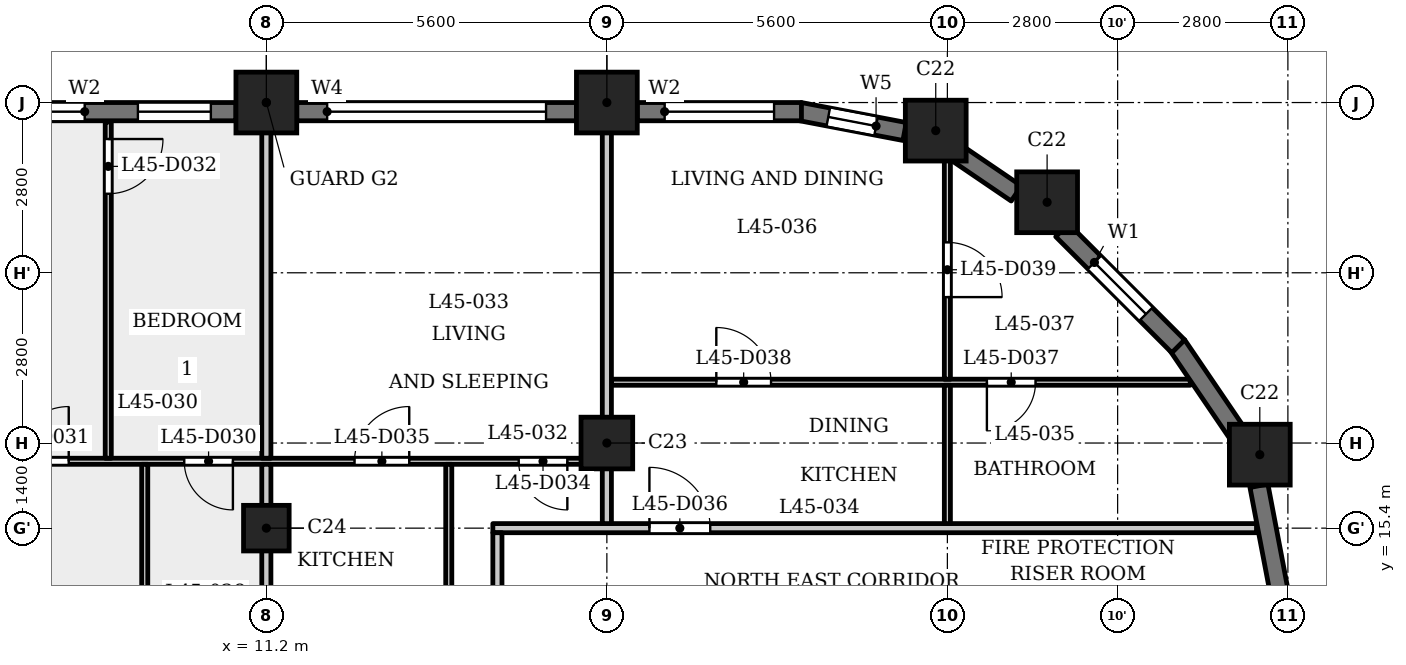
"""IFC4 building model, lengths in metres.
Left out: names, types, materials, properties, quantities, classifications, styles, units other than length and angle.
Written with IfcOpenShell. Run it as: python <this file> out.ifc"""

import sys

from ifc_helpers import new_model, si_unit, direction, frame, frame_2d, origin, origin_2d, place, context, subcontext, project, spatial, rectangle, extrude, element, fill, save


model = new_model("IFC4")
c1 = context("Model", 3, precision=1e-05, world=origin(), true_north=direction((0.0, 1.0)))
c2 = subcontext(c1, "Body", "Model", "MODEL_VIEW")
j1 = project(units=[si_unit("LENGTHUNIT", "METRE"), si_unit("PLANEANGLEUNIT", "RADIAN")], contexts=[c1])
p1 = place(None, origin())
s1 = spatial("IfcSite", under=j1, at=p1, CompositionType="ELEMENT")
p2 = place(p1, origin())
s2 = spatial("IfcBuilding", under=s1, at=p2, CompositionType="ELEMENT")
p3 = place(p2, frame((0.0, 0.0, 174.6)))
s3 = spatial("IfcBuildingStorey", under=s2, at=p3, CompositionType="ELEMENT", Elevation=174.6)
for number, where, z_axis, x_axis in (
    (1, (27.538, 16.609, 0.0), (0.0, 0.0, 1.0), (1.0, 0.0, 0.0)),
    (2, (24.04, 20.76, 0.0), (0.0, 0.0, 1.0), (1.0, 0.0, 0.0)),
    (3, (22.209, 21.938, 0.0), (0.0, 0.0, 1.0), (1.0, 0.0, 0.0)),
    (4, (16.8, 22.4, 0.0), (0.0, 0.0, 1.0), (1.0, 0.0, 0.0)),
    (5, (11.2, 22.4, 0.0), (0.0, 0.0, 1.0), (1.0, 0.0, 0.0)),
):
    element("IfcColumn", number, at=place(p3, frame(where, z_axis=z_axis, x_axis=x_axis)), inside=s3, PredefinedType="COLUMN", context=c2, shape_type="SweptSolid", body=[
        extrude(rectangle(XDim=1.0, YDim=1.0, at=origin_2d()), origin(), (0.0, 0.0, 1.0), 3.5),
    ])
p4 = place(p3, frame((16.8, 16.8, 0.0), z_axis=(0.0, 0.0, 1.0), x_axis=(1.0, 0.0, 0.0)))
e6 = element("IfcColumn", 6, at=p4, inside=s3, PredefinedType="COLUMN", context=c2, shape_type="SweptSolid", body=[
    extrude(rectangle(XDim=0.85, YDim=0.85, at=origin_2d()), origin(), (0.0, 0.0, 1.0), 3.5),
])
p5 = place(p3, frame((11.2, 15.4, 0.0), z_axis=(0.0, 0.0, 1.0), x_axis=(1.0, 0.0, 0.0)))
e7 = element("IfcColumn", 7, at=p5, inside=s3, PredefinedType="COLUMN", context=c2, shape_type="SweptSolid", body=[
    extrude(rectangle(XDim=0.75, YDim=0.75, at=origin_2d()), origin(), (0.0, 0.0, 1.0), 3.5),
])
for number, where, z_axis, x_axis in (
    (8, (27.853, 14.372, 0.0), (0.0, 0.0, 1.0), (-0.187, 0.982, 0.0)),
    (9, (27.166, 16.96, 0.0), (0.0, 0.0, 1.0), (-0.562, 0.827, 0.0)),
):
    element("IfcWall", number, at=place(p3, frame(where, z_axis=z_axis, x_axis=x_axis)), inside=s3, PredefinedType="SOLIDWALL", context=c2, shape_type="SweptSolid", body=[
        extrude(rectangle(XDim=1.756, YDim=0.3, at=frame_2d((0.878, 0.0))), origin(), (0.0, 0.0, 1.0), 2.4),
    ])
p6 = place(p3, frame((26.197, 18.391, 0.0), z_axis=(0.0, 0.0, 1.0), x_axis=(-0.707061571201, 0.707151988282, 0.0)))
e10 = element("IfcWall", 10, at=p6, inside=s3, PredefinedType="SOLIDWALL", context=c2, shape_type="SweptSolid", body=[
    extrude(rectangle(XDim=2.7, YDim=0.3, at=frame_2d((1.35, 0.0))), origin(), (0.0, 0.0, 1.0), 2.4),
])
p7 = place(p6, frame((0.75, 0.0, 0.6)))
e11 = element("IfcOpeningElement", 11, at=p7, cuts=e10, PredefinedType="OPENING", context=c2, shape_type="SweptSolid", body=[
    extrude(rectangle(XDim=1.2, YDim=1.55, at=frame_2d((0.6, 0.775))), frame((0.0, 0.16, 0.0), z_axis=(0.0, -1.0, 0.0), x_axis=(1.0, 0.0, 0.0)), (0.0, 0.0, 1.0), 0.32),
])
p8 = place(p3, frame((23.534, 20.904, 0.0), z_axis=(0.0, 0.0, 1.0), x_axis=(-0.827103906596, 0.56204904385, 0.0)))
e12 = element("IfcWall", 12, at=p8, inside=s3, PredefinedType="SOLIDWALL", context=c2, shape_type="SweptSolid", body=[
    extrude(rectangle(XDim=1.177, YDim=0.3, at=frame_2d((0.589, 0.0))), origin(), (0.0, 0.0, 1.0), 3.15),
])
p9 = place(p3, frame((21.697, 21.924, 0.0), z_axis=(0.0, 0.0, 1.0), x_axis=(-0.982284988433, 0.187393173565, 0.0)))
e13 = element("IfcWall", 13, at=p9, inside=s3, PredefinedType="SOLIDWALL", context=c2, shape_type="SweptSolid", body=[
    extrude(rectangle(XDim=1.756, YDim=0.3, at=frame_2d((0.878, 0.0))), origin(), (0.0, 0.0, 1.0), 2.4),
])
p10 = place(p9, frame((0.478, 0.0, 0.6)))
e14 = element("IfcOpeningElement", 14, at=p10, cuts=e13, PredefinedType="OPENING", context=c2, shape_type="SweptSolid", body=[
    extrude(rectangle(XDim=0.8, YDim=1.55, at=frame_2d((0.4, 0.775))), frame((0.0, 0.16, 0.0), z_axis=(0.0, -1.0, 0.0), x_axis=(1.0, 0.0, 0.0)), (0.0, 0.0, 1.0), 0.32),
])
p11 = place(p3, frame((20.0, 22.25, 0.0), z_axis=(0.0, 0.0, 1.0), x_axis=(-1.0, 0.0, 0.0)))
e15 = element("IfcWall", 15, at=p11, inside=s3, PredefinedType="SOLIDWALL", context=c2, shape_type="SweptSolid", body=[
    extrude(rectangle(XDim=2.7, YDim=0.3, at=frame_2d((1.35, 0.0))), origin(), (0.0, 0.0, 1.0), 2.4),
])
p12 = place(p11, frame((0.45, 0.0, 0.9)))
e16 = element("IfcOpeningElement", 16, at=p12, cuts=e15, PredefinedType="OPENING", context=c2, shape_type="SweptSolid", body=[
    extrude(rectangle(XDim=1.8, YDim=1.25, at=frame_2d((0.9, 0.625))), frame((0.0, 0.16, 0.0), z_axis=(0.0, -1.0, 0.0), x_axis=(1.0, 0.0, 0.0)), (0.0, 0.0, 1.0), 0.32),
])
p13 = place(p3, frame((16.3, 22.25, 0.0), z_axis=(0.0, 0.0, 1.0), x_axis=(-1.0, 0.0, 0.0)))
e17 = element("IfcWall", 17, at=p13, inside=s3, PredefinedType="SOLIDWALL", context=c2, shape_type="SweptSolid", body=[
    extrude(rectangle(XDim=4.6, YDim=0.3, at=frame_2d((2.3, 0.0))), origin(), (0.0, 0.0, 1.0), 2.4),
])
p14 = place(p13, frame((0.5, 0.0, 1.2)))
e18 = element("IfcOpeningElement", 18, at=p14, cuts=e17, PredefinedType="OPENING", context=c2, shape_type="SweptSolid", body=[
    extrude(rectangle(XDim=3.6, YDim=0.95, at=frame_2d((1.8, 0.475))), frame((0.0, 0.16, 0.0), z_axis=(0.0, -1.0, 0.0), x_axis=(1.0, 0.0, 0.0)), (0.0, 0.0, 1.0), 0.32),
])
p15 = place(p3, frame((10.7, 22.25, 0.0), z_axis=(0.0, 0.0, 1.0), x_axis=(-1.0, 0.0, 0.0)))
e19 = element("IfcWall", 19, at=p15, inside=s3, PredefinedType="SOLIDWALL", context=c2, shape_type="SweptSolid", body=[
    extrude(rectangle(XDim=4.6, YDim=0.3, at=frame_2d((2.3, 0.0))), origin(), (0.0, 0.0, 1.0), 2.4),
])
p16 = place(p15, frame((0.413, 0.0, 0.6)))
e20 = element("IfcOpeningElement", 20, at=p16, cuts=e19, PredefinedType="OPENING", context=c2, shape_type="SweptSolid", body=[
    extrude(rectangle(XDim=1.2, YDim=1.55, at=frame_2d((0.6, 0.775))), frame((0.0, 0.16, 0.0), z_axis=(0.0, -1.0, 0.0), x_axis=(1.0, 0.0, 0.0)), (0.0, 0.0, 1.0), 0.32),
])
p17 = place(p15, frame((2.488, 0.0, 0.9)))
e21 = element("IfcOpeningElement", 21, at=p17, cuts=e19, PredefinedType="OPENING", context=c2, shape_type="SweptSolid", body=[
    extrude(rectangle(XDim=1.8, YDim=1.25, at=frame_2d((0.9, 0.625))), frame((0.0, 0.16, 0.0), z_axis=(0.0, -1.0, 0.0), x_axis=(1.0, 0.0, 0.0)), (0.0, 0.0, 1.0), 0.32),
])
p18 = place(p3, frame((14.925, 15.4, 0.0), z_axis=(0.0, 0.0, 1.0), x_axis=(1.0, 0.0, 0.0)))
e22 = element("IfcWall", 22, at=p18, inside=s3, PredefinedType="PARTITIONING", context=c2, shape_type="SweptSolid", body=[
    extrude(rectangle(XDim=12.559, YDim=0.15, at=frame_2d((6.279, 0.0))), origin(), (0.0, 0.0, 1.0), 3.15),
])
p19 = place(p18, frame((2.575, 0.0, 0.0)))
e23 = element("IfcOpeningElement", 23, at=p19, cuts=e22, PredefinedType="OPENING", context=c2, shape_type="SweptSolid", body=[
    extrude(rectangle(XDim=1.0, YDim=2.1, at=frame_2d((0.5, 1.05))), frame((0.0, 0.085, 0.0), z_axis=(0.0, -1.0, 0.0), x_axis=(1.0, 0.0, 0.0)), (0.0, 0.0, 1.0), 0.17),
])
p20 = place(p3, frame((-16.725, 16.5, 0.0), z_axis=(0.0, 0.0, 1.0), x_axis=(1.0, 0.0, 0.0)))
e24 = element("IfcWall", 24, at=p20, inside=s3, PredefinedType="PARTITIONING", context=c2, shape_type="SweptSolid", body=[
    extrude(rectangle(XDim=33.45, YDim=0.1, at=frame_2d((16.725, 0.0))), origin(), (0.0, 0.0, 1.0), 3.15),
])
p21 = place(p20, frame((0.575, 0.0, 0.0)))
e25 = element("IfcOpeningElement", 25, at=p21, cuts=e24, PredefinedType="OPENING", context=c2, shape_type="SweptSolid", body=[
    extrude(rectangle(XDim=0.8, YDim=2.1, at=frame_2d((0.4, 1.05))), frame((0.0, 0.06, 0.0), z_axis=(0.0, -1.0, 0.0), x_axis=(1.0, 0.0, 0.0)), (0.0, 0.0, 1.0), 0.12),
])
p22 = place(p20, frame((3.225, 0.0, 0.0)))
e26 = element("IfcOpeningElement", 26, at=p22, cuts=e24, PredefinedType="OPENING", context=c2, shape_type="SweptSolid", body=[
    extrude(rectangle(XDim=0.9, YDim=2.1, at=frame_2d((0.45, 1.05))), frame((0.0, 0.06, 0.0), z_axis=(0.0, -1.0, 0.0), x_axis=(1.0, 0.0, 0.0)), (0.0, 0.0, 1.0), 0.12),
])
p23 = place(p20, frame((6.775, 0.0, 0.0)))
e27 = element("IfcOpeningElement", 27, at=p23, cuts=e24, PredefinedType="OPENING", context=c2, shape_type="SweptSolid", body=[
    extrude(rectangle(XDim=0.9, YDim=2.1, at=frame_2d((0.45, 1.05))), frame((0.0, 0.06, 0.0), z_axis=(0.0, -1.0, 0.0), x_axis=(1.0, 0.0, 0.0)), (0.0, 0.0, 1.0), 0.12),
])
p24 = place(p20, frame((8.825, 0.0, 0.0)))
e28 = element("IfcOpeningElement", 28, at=p24, cuts=e24, PredefinedType="OPENING", context=c2, shape_type="SweptSolid", body=[
    extrude(rectangle(XDim=0.9, YDim=2.1, at=frame_2d((0.45, 1.05))), frame((0.0, 0.06, 0.0), z_axis=(0.0, -1.0, 0.0), x_axis=(1.0, 0.0, 0.0)), (0.0, 0.0, 1.0), 0.12),
])
p25 = place(p20, frame((20.775, 0.0, 0.0)))
e29 = element("IfcOpeningElement", 29, at=p25, cuts=e24, PredefinedType="OPENING", context=c2, shape_type="SweptSolid", body=[
    extrude(rectangle(XDim=0.8, YDim=2.1, at=frame_2d((0.4, 1.05))), frame((0.0, 0.06, 0.0), z_axis=(0.0, -1.0, 0.0), x_axis=(1.0, 0.0, 0.0)), (0.0, 0.0, 1.0), 0.12),
])
p26 = place(p20, frame((17.325, 0.0, 0.0)))
e30 = element("IfcOpeningElement", 30, at=p26, cuts=e24, PredefinedType="OPENING", context=c2, shape_type="SweptSolid", body=[
    extrude(rectangle(XDim=0.9, YDim=2.1, at=frame_2d((0.45, 1.05))), frame((0.0, 0.06, 0.0), z_axis=(0.0, -1.0, 0.0), x_axis=(1.0, 0.0, 0.0)), (0.0, 0.0, 1.0), 0.12),
])
p27 = place(p20, frame((12.375, 0.0, 0.0)))
e31 = element("IfcOpeningElement", 31, at=p27, cuts=e24, PredefinedType="OPENING", context=c2, shape_type="SweptSolid", body=[
    extrude(rectangle(XDim=0.9, YDim=2.1, at=frame_2d((0.45, 1.05))), frame((0.0, 0.06, 0.0), z_axis=(0.0, -1.0, 0.0), x_axis=(1.0, 0.0, 0.0)), (0.0, 0.0, 1.0), 0.12),
])
p28 = place(p20, frame((14.425, 0.0, 0.0)))
e32 = element("IfcOpeningElement", 32, at=p28, cuts=e24, PredefinedType="OPENING", context=c2, shape_type="SweptSolid", body=[
    extrude(rectangle(XDim=0.9, YDim=2.1, at=frame_2d((0.45, 1.05))), frame((0.0, 0.06, 0.0), z_axis=(0.0, -1.0, 0.0), x_axis=(1.0, 0.0, 0.0)), (0.0, 0.0, 1.0), 0.12),
])
p29 = place(p20, frame((26.575, 0.0, 0.0)))
e33 = element("IfcOpeningElement", 33, at=p29, cuts=e24, PredefinedType="OPENING", context=c2, shape_type="SweptSolid", body=[
    extrude(rectangle(XDim=0.8, YDim=2.1, at=frame_2d((0.4, 1.05))), frame((0.0, 0.06, 0.0), z_axis=(0.0, -1.0, 0.0), x_axis=(1.0, 0.0, 0.0)), (0.0, 0.0, 1.0), 0.12),
])
p30 = place(p20, frame((23.775, 0.0, 0.0)))
e34 = element("IfcOpeningElement", 34, at=p30, cuts=e24, PredefinedType="OPENING", context=c2, shape_type="SweptSolid", body=[
    extrude(rectangle(XDim=0.9, YDim=2.1, at=frame_2d((0.45, 1.05))), frame((0.0, 0.06, 0.0), z_axis=(0.0, -1.0, 0.0), x_axis=(1.0, 0.0, 0.0)), (0.0, 0.0, 1.0), 0.12),
])
p31 = place(p20, frame((32.075, 0.0, 0.0)))
e35 = element("IfcOpeningElement", 35, at=p31, cuts=e24, PredefinedType="OPENING", context=c2, shape_type="SweptSolid", body=[
    extrude(rectangle(XDim=0.8, YDim=2.1, at=frame_2d((0.4, 1.05))), frame((0.0, 0.06, 0.0), z_axis=(0.0, -1.0, 0.0), x_axis=(1.0, 0.0, 0.0)), (0.0, 0.0, 1.0), 0.12),
])
p32 = place(p20, frame((29.375, 0.0, 0.0)))
e36 = element("IfcOpeningElement", 36, at=p32, cuts=e24, PredefinedType="OPENING", context=c2, shape_type="SweptSolid", body=[
    extrude(rectangle(XDim=0.9, YDim=2.1, at=frame_2d((0.45, 1.05))), frame((0.0, 0.06, 0.0), z_axis=(0.0, -1.0, 0.0), x_axis=(1.0, 0.0, 0.0)), (0.0, 0.0, 1.0), 0.12),
])
p33 = place(p3, frame((16.875, 17.8, 0.0), z_axis=(0.0, 0.0, 1.0), x_axis=(1.0, 0.0, 0.0)))
e37 = element("IfcWall", 37, at=p33, inside=s3, PredefinedType="PARTITIONING", context=c2, shape_type="SweptSolid", body=[
    extrude(rectangle(XDim=9.519, YDim=0.1, at=frame_2d((4.76, 0.0))), origin(), (0.0, 0.0, 1.0), 3.15),
])
p34 = place(p33, frame((6.175, 0.0, 0.0)))
e38 = element("IfcOpeningElement", 38, at=p34, cuts=e37, PredefinedType="OPENING", context=c2, shape_type="SweptSolid", body=[
    extrude(rectangle(XDim=0.8, YDim=2.1, at=frame_2d((0.4, 1.05))), frame((0.0, 0.06, 0.0), z_axis=(0.0, -1.0, 0.0), x_axis=(1.0, 0.0, 0.0)), (0.0, 0.0, 1.0), 0.12),
])
p35 = place(p33, frame((1.725, 0.0, 0.0)))
e39 = element("IfcOpeningElement", 39, at=p35, cuts=e37, PredefinedType="OPENING", context=c2, shape_type="SweptSolid", body=[
    extrude(rectangle(XDim=0.9, YDim=2.1, at=frame_2d((0.45, 1.05))), frame((0.0, 0.06, 0.0), z_axis=(0.0, -1.0, 0.0), x_axis=(1.0, 0.0, 0.0)), (0.0, 0.0, 1.0), 0.12),
])
p36 = place(p3, frame((8.6, 16.55, 0.0), z_axis=(0.0, 0.0, 1.0), x_axis=(0.0, 1.0, 0.0)))
e40 = element("IfcWall", 40, at=p36, inside=s3, PredefinedType="PARTITIONING", context=c2, shape_type="SweptSolid", body=[
    extrude(rectangle(XDim=5.53, YDim=0.1, at=frame_2d((2.765, 0.0))), origin(), (0.0, 0.0, 1.0), 3.15),
])
p37 = place(p36, frame((4.35, 0.0, 0.0)))
e41 = element("IfcOpeningElement", 41, at=p37, cuts=e40, PredefinedType="OPENING", context=c2, shape_type="SweptSolid", body=[
    extrude(rectangle(XDim=0.9, YDim=2.1, at=frame_2d((0.45, 1.05))), frame((0.0, 0.06, 0.0), z_axis=(0.0, -1.0, 0.0), x_axis=(1.0, 0.0, 0.0)), (0.0, 0.0, 1.0), 0.12),
])
p38 = place(p3, frame((9.2, 13.275, 0.0), z_axis=(0.0, 0.0, 1.0), x_axis=(0.0, 1.0, 0.0)))
e42 = element("IfcWall", 42, at=p38, inside=s3, PredefinedType="PARTITIONING", context=c2, shape_type="SweptSolid", body=[
    extrude(rectangle(XDim=3.175, YDim=0.1, at=frame_2d((1.587, 0.0))), origin(), (0.0, 0.0, 1.0), 3.15),
])
p39 = place(p3, frame((11.2, 13.275, 0.0), z_axis=(0.0, 0.0, 1.0), x_axis=(0.0, 1.0, 0.0)))
e43 = element("IfcWall", 43, at=p39, inside=s3, PredefinedType="PARTITIONING", context=c2, shape_type="SweptSolid", body=[
    extrude(rectangle(XDim=3.175, YDim=0.15, at=frame_2d((1.587, 0.0))), origin(), (0.0, 0.0, 1.0), 3.15),
])
p40 = place(p3, frame((11.2, 16.55, 0.0), z_axis=(0.0, 0.0, 1.0), x_axis=(0.0, 1.0, 0.0)))
e44 = element("IfcWall", 44, at=p40, inside=s3, PredefinedType="PARTITIONING", context=c2, shape_type="SweptSolid", body=[
    extrude(rectangle(XDim=6.33, YDim=0.15, at=frame_2d((3.165, 0.0))), origin(), (0.0, 0.0, 1.0), 3.15),
])
p41 = place(p3, frame((14.2, 13.275, 0.0), z_axis=(0.0, 0.0, 1.0), x_axis=(0.0, 1.0, 0.0)))
e45 = element("IfcWall", 45, at=p41, inside=s3, PredefinedType="PARTITIONING", context=c2, shape_type="SweptSolid", body=[
    extrude(rectangle(XDim=3.175, YDim=0.1, at=frame_2d((1.587, 0.0))), origin(), (0.0, 0.0, 1.0), 3.15),
])
p42 = place(p3, frame((15.0, 13.275, 0.0), z_axis=(0.0, 0.0, 1.0), x_axis=(0.0, 1.0, 0.0)))
e46 = element("IfcWall", 46, at=p42, inside=s3, PredefinedType="PARTITIONING", context=c2, shape_type="SweptSolid", body=[
    extrude(rectangle(XDim=2.05, YDim=0.15, at=frame_2d((1.025, 0.0))), origin(), (0.0, 0.0, 1.0), 3.15),
])
p43 = place(p3, frame((16.8, 15.475, 0.0), z_axis=(0.0, 0.0, 1.0), x_axis=(0.0, 1.0, 0.0)))
e47 = element("IfcWall", 47, at=p43, inside=s3, PredefinedType="PARTITIONING", context=c2, shape_type="SweptSolid", body=[
    extrude(rectangle(XDim=7.405, YDim=0.15, at=frame_2d((3.702, 0.0))), origin(), (0.0, 0.0, 1.0), 3.15),
])
p44 = place(p3, frame((22.4, 15.475, 0.0), z_axis=(0.0, 0.0, 1.0), x_axis=(0.0, 1.0, 0.0)))
e48 = element("IfcWall", 48, at=p44, inside=s3, PredefinedType="PARTITIONING", context=c2, shape_type="SweptSolid", body=[
    extrude(rectangle(XDim=2.275, YDim=0.1, at=frame_2d((1.137, 0.0))), origin(), (0.0, 0.0, 1.0), 3.15),
])
p45 = place(p3, frame((22.4, 17.85, 0.0), z_axis=(0.0, 0.0, 1.0), x_axis=(0.0, 1.0, 0.0)))
e49 = element("IfcWall", 49, at=p45, inside=s3, PredefinedType="PARTITIONING", context=c2, shape_type="SweptSolid", body=[
    extrude(rectangle(XDim=3.87, YDim=0.1, at=frame_2d((1.935, 0.0))), origin(), (0.0, 0.0, 1.0), 3.15),
])
p46 = place(p45, frame((1.35, 0.0, 0.0)))
e50 = element("IfcOpeningElement", 50, at=p46, cuts=e49, PredefinedType="OPENING", context=c2, shape_type="SweptSolid", body=[
    extrude(rectangle(XDim=0.9, YDim=2.1, at=frame_2d((0.45, 1.05))), frame((0.0, 0.06, 0.0), z_axis=(0.0, -1.0, 0.0), x_axis=(1.0, 0.0, 0.0)), (0.0, 0.0, 1.0), 0.12),
])
p47 = place(p29, origin())
e51 = element("IfcDoor", 51, at=p47, inside=s3, OperationType="SINGLE_SWING_RIGHT", PredefinedType="DOOR", context=c2, shape_type="SweptSolid", body=[
    extrude(rectangle(XDim=0.8, YDim=2.1, at=frame_2d((0.4, 1.05))), frame((0.0, 0.025, 0.0), z_axis=(0.0, -1.0, 0.0), x_axis=(1.0, 0.0, 0.0)), (0.0, 0.0, 1.0), 0.05),
])
fill(e33, e51)
p48 = place(p30, origin())
e52 = element("IfcDoor", 52, at=p48, inside=s3, OperationType="SINGLE_SWING_LEFT", PredefinedType="DOOR", context=c2, shape_type="SweptSolid", body=[
    extrude(rectangle(XDim=0.9, YDim=2.1, at=frame_2d((0.45, 1.05))), frame((0.0, 0.025, 0.0), z_axis=(0.0, -1.0, 0.0), x_axis=(1.0, 0.0, 0.0)), (0.0, 0.0, 1.0), 0.05),
])
fill(e34, e52)
p49 = place(p37, origin())
e53 = element("IfcDoor", 53, at=p49, inside=s3, OperationType="SINGLE_SWING_RIGHT", PredefinedType="DOOR", context=c2, shape_type="SweptSolid", body=[
    extrude(rectangle(XDim=0.9, YDim=2.1, at=frame_2d((0.45, 1.05))), frame((0.0, 0.025, 0.0), z_axis=(0.0, -1.0, 0.0), x_axis=(1.0, 0.0, 0.0)), (0.0, 0.0, 1.0), 0.05),
])
fill(e41, e53)
p50 = place(p31, origin())
e54 = element("IfcDoor", 54, at=p50, inside=s3, OperationType="SINGLE_SWING_RIGHT", PredefinedType="DOOR", context=c2, shape_type="SweptSolid", body=[
    extrude(rectangle(XDim=0.8, YDim=2.1, at=frame_2d((0.4, 1.05))), frame((0.0, 0.025, 0.0), z_axis=(0.0, -1.0, 0.0), x_axis=(1.0, 0.0, 0.0)), (0.0, 0.0, 1.0), 0.05),
])
fill(e35, e54)
p51 = place(p32, origin())
e55 = element("IfcDoor", 55, at=p51, inside=s3, OperationType="SINGLE_SWING_LEFT", PredefinedType="DOOR", context=c2, shape_type="SweptSolid", body=[
    extrude(rectangle(XDim=0.9, YDim=2.1, at=frame_2d((0.45, 1.05))), frame((0.0, 0.025, 0.0), z_axis=(0.0, -1.0, 0.0), x_axis=(1.0, 0.0, 0.0)), (0.0, 0.0, 1.0), 0.05),
])
fill(e36, e55)
p52 = place(p19, origin())
e56 = element("IfcDoor", 56, at=p52, inside=s3, OperationType="SINGLE_SWING_RIGHT", PredefinedType="DOOR", context=c2, shape_type="SweptSolid", body=[
    extrude(rectangle(XDim=1.0, YDim=2.1, at=frame_2d((0.5, 1.05))), frame((0.0, 0.025, 0.0), z_axis=(0.0, -1.0, 0.0), x_axis=(1.0, 0.0, 0.0)), (0.0, 0.0, 1.0), 0.05),
])
fill(e23, e56)
p53 = place(p34, origin())
e57 = element("IfcDoor", 57, at=p53, inside=s3, OperationType="SINGLE_SWING_LEFT", PredefinedType="DOOR", context=c2, shape_type="SweptSolid", body=[
    extrude(rectangle(XDim=0.8, YDim=2.1, at=frame_2d((0.4, 1.05))), frame((0.0, 0.025, 0.0), z_axis=(0.0, -1.0, 0.0), x_axis=(1.0, 0.0, 0.0)), (0.0, 0.0, 1.0), 0.05),
])
fill(e38, e57)
p54 = place(p35, origin())
e58 = element("IfcDoor", 58, at=p54, inside=s3, OperationType="SINGLE_SWING_RIGHT", PredefinedType="DOOR", context=c2, shape_type="SweptSolid", body=[
    extrude(rectangle(XDim=0.9, YDim=2.1, at=frame_2d((0.45, 1.05))), frame((0.0, 0.025, 0.0), z_axis=(0.0, -1.0, 0.0), x_axis=(1.0, 0.0, 0.0)), (0.0, 0.0, 1.0), 0.05),
])
fill(e39, e58)
p55 = place(p46, origin())
e59 = element("IfcDoor", 59, at=p55, inside=s3, OperationType="SINGLE_SWING_LEFT", PredefinedType="DOOR", context=c2, shape_type="SweptSolid", body=[
    extrude(rectangle(XDim=0.9, YDim=2.1, at=frame_2d((0.45, 1.05))), frame((0.0, 0.025, 0.0), z_axis=(0.0, -1.0, 0.0), x_axis=(1.0, 0.0, 0.0)), (0.0, 0.0, 1.0), 0.05),
])
fill(e50, e59)
p56 = place(p7, origin())
e60 = element("IfcWindow", 60, at=p56, inside=s3, PartitioningType="SINGLE_PANEL", PredefinedType="WINDOW", context=c2, shape_type="SweptSolid", body=[
    extrude(rectangle(XDim=1.2, YDim=1.55, at=frame_2d((0.6, 0.775))), frame((0.0, 0.03, 0.0), z_axis=(0.0, -1.0, 0.0), x_axis=(1.0, 0.0, 0.0)), (0.0, 0.0, 1.0), 0.06),
])
fill(e11, e60)
p57 = place(p10, origin())
e61 = element("IfcWindow", 61, at=p57, inside=s3, PartitioningType="SINGLE_PANEL", PredefinedType="WINDOW", context=c2, shape_type="SweptSolid", body=[
    extrude(rectangle(XDim=0.8, YDim=1.55, at=frame_2d((0.4, 0.775))), frame((0.0, 0.03, 0.0), z_axis=(0.0, -1.0, 0.0), x_axis=(1.0, 0.0, 0.0)), (0.0, 0.0, 1.0), 0.06),
])
fill(e14, e61)
p58 = place(p12, origin())
e62 = element("IfcWindow", 62, at=p58, inside=s3, PartitioningType="SINGLE_PANEL", PredefinedType="WINDOW", context=c2, shape_type="SweptSolid", body=[
    extrude(rectangle(XDim=1.8, YDim=1.25, at=frame_2d((0.9, 0.625))), frame((0.0, 0.03, 0.0), z_axis=(0.0, -1.0, 0.0), x_axis=(1.0, 0.0, 0.0)), (0.0, 0.0, 1.0), 0.06),
])
fill(e16, e62)
p59 = place(p14, origin())
e63 = element("IfcWindow", 63, at=p59, inside=s3, PartitioningType="SINGLE_PANEL", PredefinedType="WINDOW", context=c2, shape_type="SweptSolid", body=[
    extrude(rectangle(XDim=3.6, YDim=0.95, at=frame_2d((1.8, 0.475))), frame((0.0, 0.03, 0.0), z_axis=(0.0, -1.0, 0.0), x_axis=(1.0, 0.0, 0.0)), (0.0, 0.0, 1.0), 0.06),
])
fill(e18, e63)
p60 = place(p16, origin())
e64 = element("IfcWindow", 64, at=p60, inside=s3, PartitioningType="SINGLE_PANEL", PredefinedType="WINDOW", context=c2, shape_type="SweptSolid", body=[
    extrude(rectangle(XDim=1.2, YDim=1.55, at=frame_2d((0.6, 0.775))), frame((0.0, 0.03, 0.0), z_axis=(0.0, -1.0, 0.0), x_axis=(1.0, 0.0, 0.0)), (0.0, 0.0, 1.0), 0.06),
])
fill(e20, e64)
p61 = place(p17, origin())
e65 = element("IfcWindow", 65, at=p61, inside=s3, PartitioningType="SINGLE_PANEL", PredefinedType="WINDOW", context=c2, shape_type="SweptSolid", body=[
    extrude(rectangle(XDim=1.8, YDim=1.25, at=frame_2d((0.9, 0.625))), frame((0.0, 0.03, 0.0), z_axis=(0.0, -1.0, 0.0), x_axis=(1.0, 0.0, 0.0)), (0.0, 0.0, 1.0), 0.06),
])
fill(e21, e65)
save(model, sys.argv[1])
